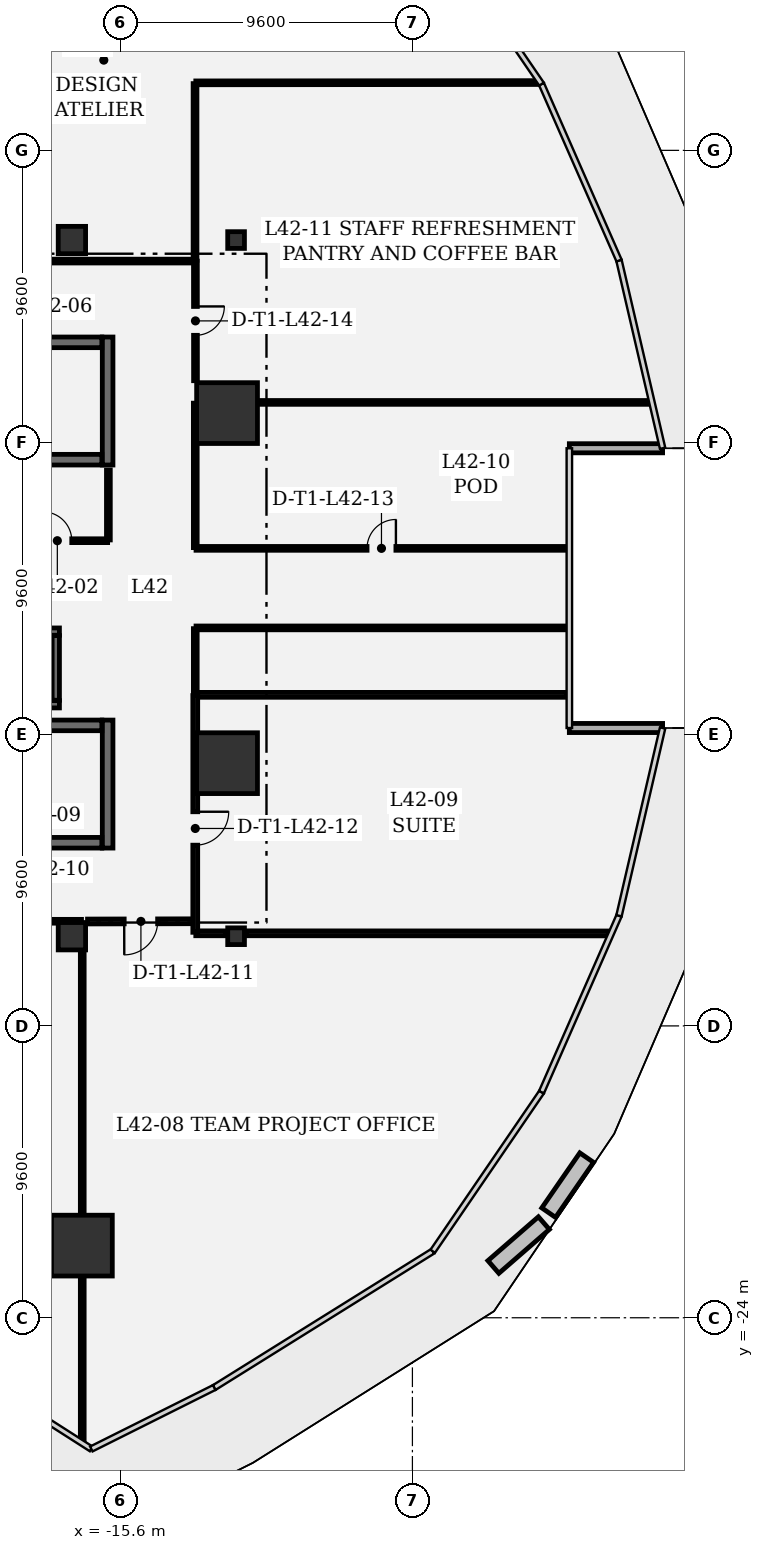
"""IFC4 building model, lengths in metres.
Left out: names, types, materials, properties, quantities, classifications, styles, units other than length and angle.
Written with IfcOpenShell. Run it as: python <this file> out.ifc"""

import sys

from ifc_helpers import new_model, si_unit, direction, frame, frame_2d, origin, origin_2d, place, context, subcontext, project, spatial, rectangle, extrude, element, fill, save


model = new_model("IFC4")
c1 = context("Model", 3, precision=1e-05, world=origin(), true_north=direction((0.0, 1.0)))
c2 = subcontext(c1, "Body", "Model", "MODEL_VIEW")
j1 = project(units=[si_unit("LENGTHUNIT", "METRE"), si_unit("PLANEANGLEUNIT", "RADIAN")], contexts=[c1])
p1 = place(None, origin())
s1 = spatial("IfcSite", under=j1, at=p1, CompositionType="ELEMENT")
p2 = place(p1, origin())
s2 = spatial("IfcBuilding", under=s1, at=p2, CompositionType="ELEMENT")
p3 = place(p2, frame((0.0, 0.0, 184.8)))
s3 = spatial("IfcBuildingStorey", under=s2, at=p3, CompositionType="ELEMENT", Elevation=184.8)
for number, where, z_axis, x_axis in (
    (1, (-16.872, -21.627, 0.0), (0.0, 0.0, 1.0), (1.0, 0.0, 0.0)),
    (2, (-12.097, -5.758, 0.0), (0.0, 0.0, 1.0), (1.0, 0.0, 0.0)),
    (3, (-12.097, 5.758, 0.0), (0.0, 0.0, 1.0), (1.0, 0.0, 0.0)),
):
    element("IfcColumn", number, at=place(p3, frame(where, z_axis=z_axis, x_axis=x_axis)), inside=s3, PredefinedType="COLUMN", context=c2, shape_type="SweptSolid", body=[
        extrude(rectangle(XDim=2.0, YDim=2.0, at=origin_2d()), origin(), (0.0, 0.0, 1.0), 4.05),
    ])
for number, where, z_axis, x_axis in (
    (4, (-17.2, 11.45, 0.0), (0.0, 0.0, 1.0), (1.0, 0.0, 0.0)),
    (5, (-17.2, -11.45, 0.0), (0.0, 0.0, 1.0), (1.0, 0.0, 0.0)),
):
    element("IfcColumn", number, at=place(p3, frame(where, z_axis=z_axis, x_axis=x_axis)), inside=s3, PredefinedType="COLUMN", context=c2, shape_type="SweptSolid", body=[
        extrude(rectangle(XDim=0.9, YDim=0.9, at=origin_2d()), origin(), (0.0, 0.0, 1.0), 4.05),
    ])
for number, where, z_axis, x_axis in (
    (6, (-11.8, -11.45, 0.0), (0.0, 0.0, 1.0), (1.0, 0.0, 0.0)),
    (7, (-11.8, 11.45, 0.0), (0.0, 0.0, 1.0), (1.0, 0.0, 0.0)),
):
    element("IfcColumn", number, at=place(p3, frame(where, z_axis=z_axis, x_axis=x_axis)), inside=s3, PredefinedType="COLUMN", context=c2, shape_type="SweptSolid", body=[
        extrude(rectangle(XDim=0.55, YDim=0.55, at=origin_2d()), origin(), (0.0, 0.0, 1.0), 4.05),
    ])
for number, where, z_axis, x_axis in (
    (8, (2.229, -4.601, 0.0), (0.0, 0.0, 1.0), (-1.0, 0.0, 0.0)),
    (9, (-0.838, 4.601, 0.0), (0.0, 0.0, 1.0), (1.0, 0.0, 0.0)),
):
    element("IfcWall", number, at=place(p3, frame(where, z_axis=z_axis, x_axis=x_axis)), inside=s3, PredefinedType="SOLIDWALL", context=c2, shape_type="SweptSolid", body=[
        extrude(rectangle(XDim=3.067, YDim=0.3, at=frame_2d((1.534, 0.0))), origin(), (0.0, 0.0, 1.0), 3.78),
    ])
p4 = place(p3, frame((-16.025, 4.05, 0.0), z_axis=(0.0, 0.0, 1.0), x_axis=(0.0, 1.0, 0.0)))
e10 = element("IfcWall", 10, at=p4, inside=s3, PredefinedType="SHEAR", context=c2, shape_type="SweptSolid", body=[
    extrude(rectangle(XDim=4.21, YDim=0.35, at=frame_2d((2.105, 0.0))), origin(), (0.0, 0.0, 1.0), 3.78),
])
p5 = place(p3, frame((-24.335, 4.225, 0.0), z_axis=(0.0, 0.0, 1.0), x_axis=(1.0, 0.0, 0.0)))
e11 = element("IfcWall", 11, at=p5, inside=s3, PredefinedType="SHEAR", context=c2, shape_type="SweptSolid", body=[
    extrude(rectangle(XDim=8.12, YDim=0.35, at=frame_2d((4.06, 0.0))), origin(), (0.0, 0.0, 1.0), 3.78),
])
p6 = place(p3, frame((-16.215, 8.085, 0.0), z_axis=(0.0, 0.0, 1.0), x_axis=(-1.0, 0.0, 0.0)))
e12 = element("IfcWall", 12, at=p6, inside=s3, PredefinedType="SHEAR", context=c2, shape_type="SweptSolid", body=[
    extrude(rectangle(XDim=8.12, YDim=0.35, at=frame_2d((4.06, 0.0))), origin(), (0.0, 0.0, 1.0), 3.78),
])
p7 = place(p6, frame((6.74, 0.0, 0.0)))
e13 = element("IfcOpeningElement", 13, at=p7, cuts=e12, PredefinedType="OPENING", context=c2, shape_type="SweptSolid", body=[
    extrude(rectangle(XDim=1.1, YDim=2.2, at=frame_2d((0.55, 1.1))), frame((0.0, 0.185, 0.0), z_axis=(0.0, -1.0, 0.0), x_axis=(1.0, 0.0, 0.0)), (0.0, 0.0, 1.0), 0.37),
])
p8 = place(p3, frame((-16.025, -8.55, 0.0), z_axis=(0.0, 0.0, 1.0), x_axis=(0.0, 1.0, 0.0)))
e14 = element("IfcWall", 14, at=p8, inside=s3, PredefinedType="SHEAR", context=c2, shape_type="SweptSolid", body=[
    extrude(rectangle(XDim=4.21, YDim=0.35, at=frame_2d((2.105, 0.0))), origin(), (0.0, 0.0, 1.0), 3.78),
])
p9 = place(p3, frame((-24.335, -8.375, 0.0), z_axis=(0.0, 0.0, 1.0), x_axis=(1.0, 0.0, 0.0)))
e15 = element("IfcWall", 15, at=p9, inside=s3, PredefinedType="SHEAR", context=c2, shape_type="SweptSolid", body=[
    extrude(rectangle(XDim=8.12, YDim=0.35, at=frame_2d((4.06, 0.0))), origin(), (0.0, 0.0, 1.0), 3.78),
])
p10 = place(p9, frame((0.28, 0.0, 0.0)))
e16 = element("IfcOpeningElement", 16, at=p10, cuts=e15, PredefinedType="OPENING", context=c2, shape_type="SweptSolid", body=[
    extrude(rectangle(XDim=1.1, YDim=2.2, at=frame_2d((0.55, 1.1))), frame((0.0, 0.185, 0.0), z_axis=(0.0, -1.0, 0.0), x_axis=(1.0, 0.0, 0.0)), (0.0, 0.0, 1.0), 0.37),
])
p11 = place(p3, frame((-16.215, -4.515, 0.0), z_axis=(0.0, 0.0, 1.0), x_axis=(-1.0, 0.0, 0.0)))
e17 = element("IfcWall", 17, at=p11, inside=s3, PredefinedType="SHEAR", context=c2, shape_type="SweptSolid", body=[
    extrude(rectangle(XDim=8.12, YDim=0.35, at=frame_2d((4.06, 0.0))), origin(), (0.0, 0.0, 1.0), 3.78),
])
for number, where, z_axis, x_axis in (
    (18, (-17.61, -3.82, 0.0), (0.0, 0.0, 1.0), (-1.0, 0.0, 0.0)),
    (19, (-19.41, -1.43, 0.0), (0.0, 0.0, 1.0), (1.0, 0.0, 0.0)),
):
    element("IfcWall", number, at=place(p3, frame(where, z_axis=z_axis, x_axis=x_axis)), inside=s3, PredefinedType="SHEAR", context=c2, shape_type="SweptSolid", body=[
        extrude(rectangle(XDim=1.8, YDim=0.24, at=frame_2d((0.9, 0.0))), origin(), (0.0, 0.0, 1.0), 3.78),
    ])
p12 = place(p3, frame((-17.73, -1.562, 0.0), z_axis=(0.0, 0.0, 1.0), x_axis=(0.0, -1.0, 0.0)))
e20 = element("IfcWall", 20, at=p12, inside=s3, PredefinedType="SHEAR", context=c2, shape_type="SweptSolid", body=[
    extrude(rectangle(XDim=2.126, YDim=0.24, at=frame_2d((1.063, 0.0))), origin(), (0.0, 0.0, 1.0), 3.78),
])
p13 = place(p3, frame((-19.334, 1.56, 0.0), z_axis=(0.0, 0.0, 1.0), x_axis=(1.0, 0.0, 0.0)))
e21 = element("IfcWall", 21, at=p13, inside=s3, PredefinedType="PARTITIONING", context=c2, shape_type="SweptSolid", body=[
    extrude(rectangle(XDim=3.309, YDim=0.125, at=frame_2d((1.654, 0.0))), origin(), (0.0, 0.0, 1.0), 3.78),
])
p14 = place(p13, frame((1.179, 0.0, 0.0)))
e22 = element("IfcOpeningElement", 22, at=p14, cuts=e21, PredefinedType="OPENING", context=c2, shape_type="SweptSolid", body=[
    extrude(rectangle(XDim=0.95, YDim=2.15, at=frame_2d((0.475, 1.075))), frame((0.0, 0.073, 0.0), z_axis=(0.0, -1.0, 0.0), x_axis=(1.0, 0.0, 0.0)), (0.0, 0.0, 1.0), 0.145),
])
p15 = place(p3, frame((-16.0, 1.585, 0.0), z_axis=(0.0, 0.0, 1.0), x_axis=(0.0, 1.0, 0.0)))
e23 = element("IfcWall", 23, at=p15, inside=s3, PredefinedType="PARTITIONING", context=c2, shape_type="SweptSolid", body=[
    extrude(rectangle(XDim=2.302, YDim=0.125, at=frame_2d((1.151, 0.0))), origin(), (0.0, 0.0, 1.0), 3.78),
])
p16 = place(p3, frame((-13.15, 10.783, 0.0), z_axis=(0.0, 0.0, 1.0), x_axis=(0.0, 1.0, 0.0)))
e24 = element("IfcWall", 24, at=p16, inside=s3, PredefinedType="PARTITIONING", context=c2, shape_type="SweptSolid", body=[
    extrude(rectangle(XDim=5.812, YDim=0.125, at=frame_2d((2.906, 0.0))), origin(), (0.0, 0.0, 1.0), 2.9),
])
p17 = place(p3, frame((-13.125, 16.621, 0.0), z_axis=(0.0, 0.0, 1.0), x_axis=(0.999999660387, 0.000824151711, 0.0)))
e25 = element("IfcWall", 25, at=p17, inside=s3, PredefinedType="PARTITIONING", context=c2, shape_type="SweptSolid", body=[
    extrude(rectangle(XDim=11.257, YDim=0.125, at=frame_2d((5.628, 0.0))), origin(), (0.0, 0.0, 1.0), 3.78),
])
p18 = place(p3, frame((-21.717, 10.758, 0.0), z_axis=(0.0, 0.0, 1.0), x_axis=(1.0, 0.0, 0.0)))
e26 = element("IfcWall", 26, at=p18, inside=s3, PredefinedType="PARTITIONING", context=c2, shape_type="SweptSolid", body=[
    extrude(rectangle(XDim=8.542, YDim=0.125, at=frame_2d((4.271, 0.0))), origin(), (0.0, 0.0, 1.0), 3.344),
])
p19 = place(p18, frame((2.711, 0.0, 0.0)))
e27 = element("IfcOpeningElement", 27, at=p19, cuts=e26, PredefinedType="OPENING", context=c2, shape_type="SweptSolid", body=[
    extrude(rectangle(XDim=0.95, YDim=2.15, at=frame_2d((0.475, 1.075))), frame((0.0, 0.073, 0.0), z_axis=(0.0, -1.0, 0.0), x_axis=(1.0, 0.0, 0.0)), (0.0, 0.0, 1.0), 0.145),
])
p20 = place(p3, frame((-16.885, -10.958, 0.0), z_axis=(0.0, 0.0, 1.0), x_axis=(-1.0, 0.0, 0.0)))
e28 = element("IfcWall", 28, at=p20, inside=s3, PredefinedType="PARTITIONING", context=c2, shape_type="SweptSolid", body=[
    extrude(rectangle(XDim=3.465, YDim=0.125, at=frame_2d((1.732, 0.0))), origin(), (0.0, 0.0, 1.0), 3.344),
])
p21 = place(p20, frame((1.258, 0.0, 0.0)))
e29 = element("IfcOpeningElement", 29, at=p21, cuts=e28, PredefinedType="OPENING", context=c2, shape_type="SweptSolid", body=[
    extrude(rectangle(XDim=0.95, YDim=2.15, at=frame_2d((0.475, 1.075))), frame((0.0, 0.073, 0.0), z_axis=(0.0, -1.0, 0.0), x_axis=(1.0, 0.0, 0.0)), (0.0, 0.0, 1.0), 0.145),
])
p22 = place(p3, frame((-16.86, -28.046, 0.0), z_axis=(0.0, 0.0, 1.0), x_axis=(0.0, 1.0, 0.0)))
e30 = element("IfcWall", 30, at=p22, inside=s3, PredefinedType="PARTITIONING", context=c2, shape_type="SweptSolid", body=[
    extrude(rectangle(XDim=5.354, YDim=0.125, at=frame_2d((2.677, 0.0))), origin(), (0.0, 0.0, 1.0), 3.78),
])
p23 = place(p3, frame((-16.86, -20.562, 0.0), z_axis=(0.0, 0.0, 1.0), x_axis=(0.0, 1.0, 0.0)))
e31 = element("IfcWall", 31, at=p23, inside=s3, PredefinedType="PARTITIONING", context=c2, shape_type="SweptSolid", body=[
    extrude(rectangle(XDim=8.597, YDim=0.125, at=frame_2d((4.298, 0.0))), origin(), (0.0, 0.0, 1.0), 2.9),
])
p24 = place(p3, frame((0.46, -11.358, 0.0), z_axis=(0.0, 0.0, 1.0), x_axis=(-0.999999924277, 0.000389160817, 0.0)))
e32 = element("IfcWall", 32, at=p24, inside=s3, PredefinedType="PARTITIONING", context=c2, shape_type="SweptSolid", body=[
    extrude(rectangle(XDim=11.92, YDim=0.16, at=frame_2d((5.96, 0.0))), origin(), (0.0, 0.0, 1.0), 3.78),
])
p25 = place(p3, frame((-12.14, -11.354, 0.0), z_axis=(0.0, 0.0, 1.0), x_axis=(-0.999999723608, 0.000743494218, 0.0)))
e33 = element("IfcWall", 33, at=p25, inside=s3, PredefinedType="PARTITIONING", context=c2, shape_type="SweptSolid", body=[
    extrude(rectangle(XDim=0.985, YDim=0.16, at=frame_2d((0.493, 0.0))), origin(), (0.0, 0.0, 1.0), 3.78),
])
p26 = place(p3, frame((-13.175, -10.958, 0.0), z_axis=(0.0, 0.0, 1.0), x_axis=(-0.999997523311, -0.002225616967, 0.0)))
e34 = element("IfcWall", 34, at=p26, inside=s3, PredefinedType="PARTITIONING", context=c2, shape_type="SweptSolid", body=[
    extrude(rectangle(XDim=3.51, YDim=0.16, at=frame_2d((1.755, 0.0))), origin(), (0.0, 0.0, 1.0), 3.344),
])
p27 = place(p26, frame((1.205, 0.0, 0.0)))
e35 = element("IfcOpeningElement", 35, at=p27, cuts=e34, PredefinedType="OPENING", context=c2, shape_type="SweptSolid", body=[
    extrude(rectangle(XDim=1.1, YDim=2.15, at=frame_2d((0.55, 1.075))), frame((0.0, 0.09, 0.0), z_axis=(0.0, -1.0, 0.0), x_axis=(1.0, 0.0, 0.0)), (0.0, 0.0, 1.0), 0.18),
])
p28 = place(p3, frame((-0.918, -3.51, 0.0), z_axis=(0.0, 0.0, 1.0), x_axis=(-1.0, 0.0, 0.0)))
e36 = element("IfcWall", 36, at=p28, inside=s3, PredefinedType="PARTITIONING", context=c2, shape_type="SweptSolid", body=[
    extrude(rectangle(XDim=12.199, YDim=0.16, at=frame_2d((6.1, 0.0))), origin(), (0.0, 0.0, 1.0), 3.78),
])
p29 = place(p3, frame((-13.142, -3.535, 0.0), z_axis=(0.0, 0.0, 1.0), x_axis=(0.0, -1.0, 0.0)))
e37 = element("IfcWall", 37, at=p29, inside=s3, PredefinedType="PARTITIONING", context=c2, shape_type="SweptSolid", body=[
    extrude(rectangle(XDim=7.786, YDim=0.16, at=frame_2d((3.893, 0.0))), origin(), (0.0, 0.0, 1.0), 2.9),
])
p30 = place(p29, frame((3.821, 0.0, 0.0)))
e38 = element("IfcOpeningElement", 38, at=p30, cuts=e37, PredefinedType="OPENING", context=c2, shape_type="SweptSolid", body=[
    extrude(rectangle(XDim=1.1, YDim=2.15, at=frame_2d((0.55, 1.075))), frame((0.0, 0.09, 0.0), z_axis=(0.0, -1.0, 0.0), x_axis=(1.0, 0.0, 0.0)), (0.0, 0.0, 1.0), 0.18),
])
p31 = place(p3, frame((1.799, 6.109, 0.0), z_axis=(0.0, 0.0, 1.0), x_axis=(-1.0, 0.0, 0.0)))
e39 = element("IfcWall", 39, at=p31, inside=s3, PredefinedType="PARTITIONING", context=c2, shape_type="SweptSolid", body=[
    extrude(rectangle(XDim=12.831, YDim=0.125, at=frame_2d((6.415, 0.0))), origin(), (0.0, 0.0, 1.0), 3.78),
])
p32 = place(p3, frame((-13.142, 6.084, 0.0), z_axis=(0.0, 0.0, 1.0), x_axis=(0.0, -1.0, 0.0)))
e40 = element("IfcWall", 40, at=p32, inside=s3, PredefinedType="PARTITIONING", context=c2, shape_type="SweptSolid", body=[
    extrude(rectangle(XDim=4.751, YDim=0.125, at=frame_2d((2.375, 0.0))), origin(), (0.0, 0.0, 1.0), 3.78),
])
p33 = place(p3, frame((-13.117, 1.308, 0.0), z_axis=(0.0, 0.0, 1.0), x_axis=(1.0, 0.0, 0.0)))
e41 = element("IfcWall", 41, at=p33, inside=s3, PredefinedType="PARTITIONING", context=c2, shape_type="SweptSolid", body=[
    extrude(rectangle(XDim=12.199, YDim=0.125, at=frame_2d((6.1, 0.0))), origin(), (0.0, 0.0, 1.0), 3.78),
])
p34 = place(p33, frame((5.625, 0.0, 0.0)))
e42 = element("IfcOpeningElement", 42, at=p34, cuts=e41, PredefinedType="OPENING", context=c2, shape_type="SweptSolid", body=[
    extrude(rectangle(XDim=0.95, YDim=2.15, at=frame_2d((0.475, 1.075))), frame((0.0, 0.073, 0.0), z_axis=(0.0, -1.0, 0.0), x_axis=(1.0, 0.0, 0.0)), (0.0, 0.0, 1.0), 0.145),
])
p35 = place(p3, frame((-13.117, -1.308, 0.0), z_axis=(0.0, 0.0, 1.0), x_axis=(1.0, 0.0, 0.0)))
e43 = element("IfcWall", 43, at=p35, inside=s3, PredefinedType="PARTITIONING", context=c2, shape_type="SweptSolid", body=[
    extrude(rectangle(XDim=12.199, YDim=0.125, at=frame_2d((6.1, 0.0))), origin(), (0.0, 0.0, 1.0), 3.78),
])
p36 = place(p3, frame((-13.142, -1.333, 0.0), z_axis=(0.0, 0.0, 1.0), x_axis=(0.0, -1.0, 0.0)))
e44 = element("IfcWall", 44, at=p36, inside=s3, PredefinedType="PARTITIONING", context=c2, shape_type="SweptSolid", body=[
    extrude(rectangle(XDim=2.144, YDim=0.125, at=frame_2d((1.072, 0.0))), origin(), (0.0, 0.0, 1.0), 3.78),
])
p37 = place(p3, frame((-13.138, 10.758, 0.0), z_axis=(0.0, 0.0, 1.0), x_axis=(0.000806501382, -0.999999674778, 0.0)))
e45 = element("IfcWall", 45, at=p37, inside=s3, PredefinedType="PARTITIONING", context=c2, shape_type="SweptSolid", body=[
    extrude(rectangle(XDim=3.935, YDim=0.125, at=frame_2d((1.968, 0.0))), origin(), (0.0, 0.0, 1.0), 2.9),
])
p38 = place(p37, frame((1.493, 0.0, 0.0)))
e46 = element("IfcOpeningElement", 46, at=p38, cuts=e45, PredefinedType="OPENING", context=c2, shape_type="SweptSolid", body=[
    extrude(rectangle(XDim=0.95, YDim=2.15, at=frame_2d((0.475, 1.075))), frame((0.0, 0.073, 0.0), z_axis=(0.0, -1.0, 0.0), x_axis=(1.0, 0.0, 0.0)), (0.0, 0.0, 1.0), 0.145),
])
p39 = place(p14, origin())
e47 = element("IfcDoor", 47, at=p39, inside=s3, OperationType="SINGLE_SWING_LEFT", PredefinedType="DOOR", context=c2, shape_type="SweptSolid", body=[
    extrude(rectangle(XDim=0.95, YDim=2.15, at=frame_2d((0.475, 1.075))), frame((0.0, 0.025, 0.0), z_axis=(0.0, -1.0, 0.0), x_axis=(1.0, 0.0, 0.0)), (0.0, 0.0, 1.0), 0.05),
])
fill(e22, e47)
p40 = place(p27, origin())
e48 = element("IfcDoor", 48, at=p40, inside=s3, OperationType="SINGLE_SWING_RIGHT", PredefinedType="DOOR", context=c2, shape_type="SweptSolid", body=[
    extrude(rectangle(XDim=1.1, YDim=2.15, at=frame_2d((0.55, 1.075))), frame((0.0, 0.025, 0.0), z_axis=(0.0, -1.0, 0.0), x_axis=(1.0, 0.0, 0.0)), (0.0, 0.0, 1.0), 0.05),
])
fill(e35, e48)
p41 = place(p30, origin())
e49 = element("IfcDoor", 49, at=p41, inside=s3, OperationType="SINGLE_SWING_LEFT", PredefinedType="DOOR", context=c2, shape_type="SweptSolid", body=[
    extrude(rectangle(XDim=1.1, YDim=2.15, at=frame_2d((0.55, 1.075))), frame((0.0, 0.025, 0.0), z_axis=(0.0, -1.0, 0.0), x_axis=(1.0, 0.0, 0.0)), (0.0, 0.0, 1.0), 0.05),
])
fill(e38, e49)
p42 = place(p34, origin())
e50 = element("IfcDoor", 50, at=p42, inside=s3, OperationType="SINGLE_SWING_RIGHT", PredefinedType="DOOR", context=c2, shape_type="SweptSolid", body=[
    extrude(rectangle(XDim=0.95, YDim=2.15, at=frame_2d((0.475, 1.075))), frame((0.0, 0.025, 0.0), z_axis=(0.0, -1.0, 0.0), x_axis=(1.0, 0.0, 0.0)), (0.0, 0.0, 1.0), 0.05),
])
fill(e42, e50)
p43 = place(p38, origin())
e51 = element("IfcDoor", 51, at=p43, inside=s3, OperationType="SINGLE_SWING_LEFT", PredefinedType="DOOR", context=c2, shape_type="SweptSolid", body=[
    extrude(rectangle(XDim=0.95, YDim=2.15, at=frame_2d((0.475, 1.075))), frame((0.0, 0.025, 0.0), z_axis=(0.0, -1.0, 0.0), x_axis=(1.0, 0.0, 0.0)), (0.0, 0.0, 1.0), 0.05),
])
fill(e46, e51)
save(model, sys.argv[1])
